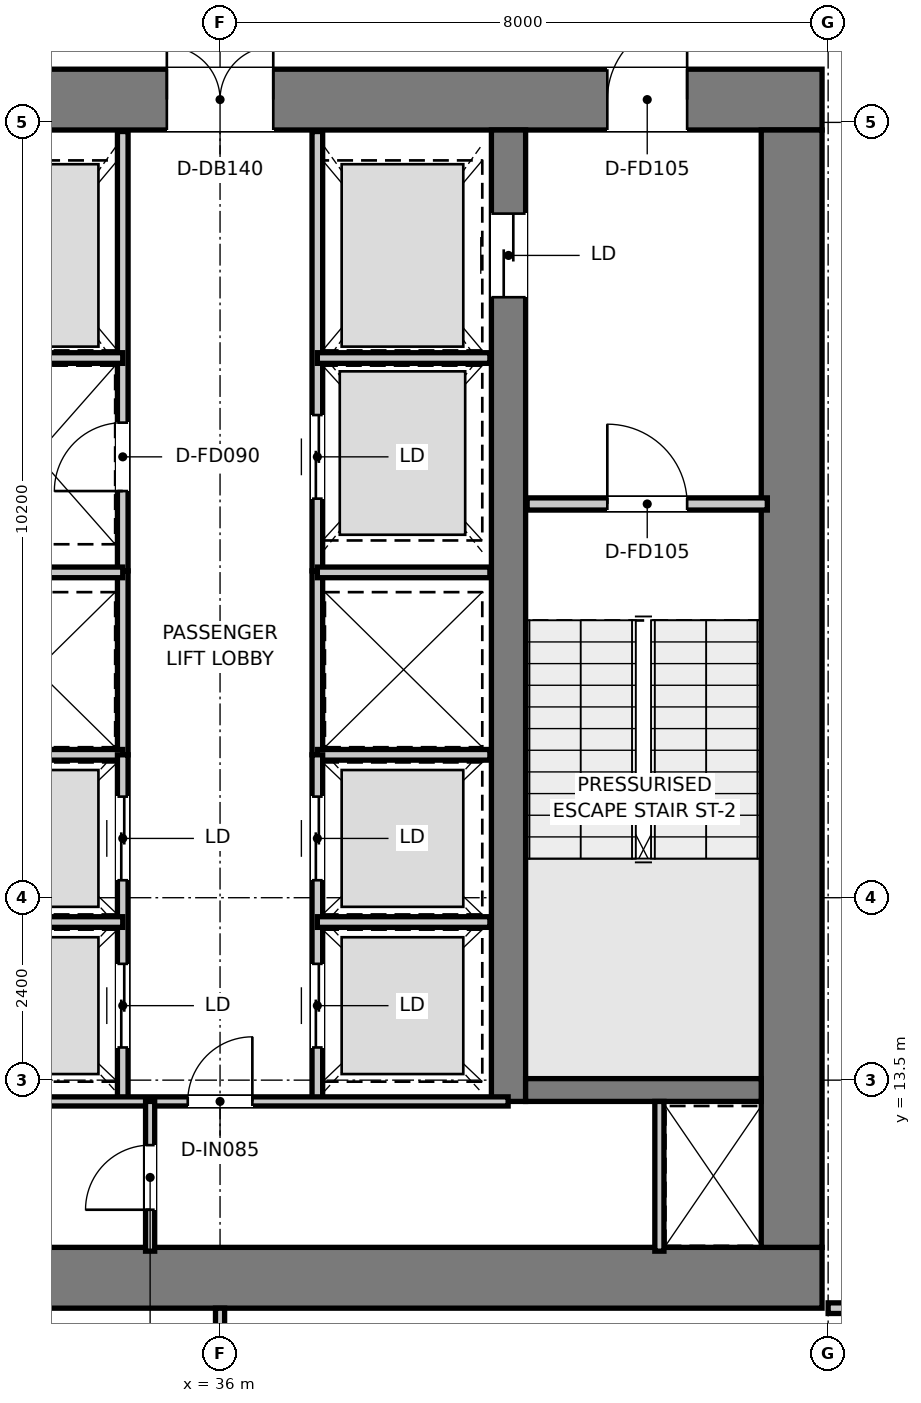
"""IFC4 building model, lengths in metres.
Left out: names, types, materials, properties, quantities, classifications, styles, units other than length and angle.
Written with IfcOpenShell. Run it as: python <this file> out.ifc"""

import sys

from ifc_helpers import new_model, si_unit, direction, frame, frame_2d, origin, place, context, subcontext, project, spatial, rectangle, extrude, element, fill, save


model = new_model("IFC4")
c1 = context("Model", 3, precision=1e-05, world=origin(), true_north=direction((0.0, 1.0)))
c2 = subcontext(c1, "Body", "Model", "MODEL_VIEW")
j1 = project(units=[si_unit("LENGTHUNIT", "METRE"), si_unit("PLANEANGLEUNIT", "RADIAN")], contexts=[c1])
p1 = place(None, origin())
s1 = spatial("IfcSite", under=j1, at=p1, CompositionType="ELEMENT")
p2 = place(p1, origin())
s2 = spatial("IfcBuilding", under=s1, at=p2, CompositionType="ELEMENT")
p3 = place(p2, frame((0.0, 0.0, 101.9)))
s3 = spatial("IfcBuildingStorey", under=s2, at=p3, CompositionType="ELEMENT", Elevation=101.9)
p4 = place(p3, frame((28.08, 10.9, 0.0), z_axis=(0.0, 0.0, 1.0), x_axis=(1.0, 0.0, 0.0)))
e1 = element("IfcWall", 1, at=p4, inside=s3, PredefinedType="SHEAR", context=c2, shape_type="SweptSolid", body=[
    extrude(rectangle(XDim=15.84, YDim=0.8, at=frame_2d((7.92, 0.0))), origin(), (0.0, 0.0, 1.0), 3.95),
])
p5 = place(p3, frame((28.08, 26.4, 0.0), z_axis=(0.0, 0.0, 1.0), x_axis=(1.0, 0.0, 0.0)))
e2 = element("IfcWall", 2, at=p5, inside=s3, PredefinedType="SHEAR", context=c2, shape_type="SweptSolid", body=[
    extrude(rectangle(XDim=15.84, YDim=0.8, at=frame_2d((7.92, 0.0))), origin(), (0.0, 0.0, 1.0), 3.95),
])
p6 = place(p5, frame((7.22, 0.0, 0.0)))
e3 = element("IfcOpeningElement", 3, at=p6, cuts=e2, PredefinedType="OPENING", context=c2, shape_type="SweptSolid", body=[
    extrude(rectangle(XDim=1.4, YDim=2.2, at=frame_2d((0.7, 1.1))), frame((0.0, 0.41, 0.0), z_axis=(0.0, -1.0, 0.0), x_axis=(1.0, 0.0, 0.0)), (0.0, 0.0, 1.0), 0.82),
])
p7 = place(p5, frame((1.775, 0.0, 0.0)))
e4 = element("IfcOpeningElement", 4, at=p7, cuts=e2, PredefinedType="OPENING", context=c2, shape_type="SweptSolid", body=[
    extrude(rectangle(XDim=1.05, YDim=2.1, at=frame_2d((0.525, 1.05))), frame((0.0, 0.41, 0.0), z_axis=(0.0, -1.0, 0.0), x_axis=(1.0, 0.0, 0.0)), (0.0, 0.0, 1.0), 0.82),
])
p8 = place(p5, frame((13.015, 0.0, 0.0)))
e5 = element("IfcOpeningElement", 5, at=p8, cuts=e2, PredefinedType="OPENING", context=c2, shape_type="SweptSolid", body=[
    extrude(rectangle(XDim=1.05, YDim=2.1, at=frame_2d((0.525, 1.05))), frame((0.0, 0.41, 0.0), z_axis=(0.0, -1.0, 0.0), x_axis=(1.0, 0.0, 0.0)), (0.0, 0.0, 1.0), 0.82),
])
p9 = place(p3, frame((43.52, 11.3, 0.0), z_axis=(0.0, 0.0, 1.0), x_axis=(0.0, 1.0, 0.0)))
e6 = element("IfcWall", 6, at=p9, inside=s3, PredefinedType="SHEAR", context=c2, shape_type="SweptSolid", body=[
    extrude(rectangle(XDim=14.7, YDim=0.8, at=frame_2d((7.35, 0.0))), origin(), (0.0, 0.0, 1.0), 3.95),
])
p10 = place(p3, frame((39.795, 13.22, 0.0), z_axis=(0.0, 0.0, 1.0), x_axis=(0.0, 1.0, 0.0)))
e7 = element("IfcWall", 7, at=p10, inside=s3, PredefinedType="SHEAR", context=c2, shape_type="SweptSolid", body=[
    extrude(rectangle(XDim=12.78, YDim=0.45, at=frame_2d((6.39, 0.0))), origin(), (0.0, 0.0, 1.0), 3.95),
])
p11 = place(p10, frame((10.58, 0.0, 0.0)))
e8 = element("IfcOpeningElement", 8, at=p11, cuts=e7, PredefinedType="OPENING", context=c2, shape_type="SweptSolid", body=[
    extrude(rectangle(XDim=1.1, YDim=2.15, at=frame_2d((0.55, 1.075))), frame((0.0, 0.235, 0.0), z_axis=(0.0, -1.0, 0.0), x_axis=(1.0, 0.0, 0.0)), (0.0, 0.0, 1.0), 0.47),
])
p12 = place(p3, frame((40.02, 13.37, 0.0), z_axis=(0.0, 0.0, 1.0), x_axis=(1.0, 0.0, 0.0)))
e9 = element("IfcWall", 9, at=p12, inside=s3, PredefinedType="SHEAR", context=c2, shape_type="SweptSolid", body=[
    extrude(rectangle(XDim=3.1, YDim=0.3, at=frame_2d((1.55, 0.0))), origin(), (0.0, 0.0, 1.0), 3.95),
])
p13 = place(p3, frame((40.04, 21.08, 0.0), z_axis=(0.0, 0.0, 1.0), x_axis=(1.0, 0.0, 0.0)))
e10 = element("IfcWall", 10, at=p13, inside=s3, PredefinedType="PARTITIONING", context=c2, shape_type="SweptSolid", body=[
    extrude(rectangle(XDim=3.16, YDim=0.16, at=frame_2d((1.58, 0.0))), origin(), (0.0, 0.0, 1.0), 3.67),
])
p14 = place(p13, frame((1.055, 0.0, 0.0)))
e11 = element("IfcOpeningElement", 11, at=p14, cuts=e10, PredefinedType="OPENING", context=c2, shape_type="SweptSolid", body=[
    extrude(rectangle(XDim=1.05, YDim=2.1, at=frame_2d((0.525, 1.05))), frame((0.0, 0.09, 0.0), z_axis=(0.0, -1.0, 0.0), x_axis=(1.0, 0.0, 0.0)), (0.0, 0.0, 1.0), 0.18),
])
p15 = place(p3, frame((34.72, 20.2, 0.0), z_axis=(0.0, 0.0, 1.0), x_axis=(0.0, 1.0, 0.0)))
e12 = element("IfcWall", 12, at=p15, inside=s3, PredefinedType="PARTITIONING", context=c2, shape_type="SweptSolid", body=[
    extrude(rectangle(XDim=5.78, YDim=0.14, at=frame_2d((2.89, 0.0))), origin(), (0.0, 0.0, 1.0), 2.67),
])
p16 = place(p15, frame((1.05, 0.0, 0.0)))
e13 = element("IfcOpeningElement", 13, at=p16, cuts=e12, PredefinedType="OPENING", context=c2, shape_type="SweptSolid", body=[
    extrude(rectangle(XDim=0.9, YDim=2.1, at=frame_2d((0.45, 1.05))), frame((0.0, 0.08, 0.0), z_axis=(0.0, -1.0, 0.0), x_axis=(1.0, 0.0, 0.0)), (0.0, 0.0, 1.0), 0.16),
])
p17 = place(p3, frame((37.28, 20.2, 0.0), z_axis=(0.0, 0.0, 1.0), x_axis=(0.0, 1.0, 0.0)))
e14 = element("IfcWall", 14, at=p17, inside=s3, PredefinedType="PARTITIONING", context=c2, shape_type="SweptSolid", body=[
    extrude(rectangle(XDim=5.78, YDim=0.14, at=frame_2d((2.89, 0.0))), origin(), (0.0, 0.0, 1.0), 2.67),
])
p18 = place(p17, frame((0.95, 0.0, 0.0)))
e15 = element("IfcOpeningElement", 15, at=p18, cuts=e14, PredefinedType="OPENING", context=c2, shape_type="SweptSolid", body=[
    extrude(rectangle(XDim=1.1, YDim=2.15, at=frame_2d((0.55, 1.075))), frame((0.0, 0.08, 0.0), z_axis=(0.0, -1.0, 0.0), x_axis=(1.0, 0.0, 0.0)), (0.0, 0.0, 1.0), 0.16),
])
for number, where, z_axis, x_axis in (
    (16, (32.45, 23.0, 0.0), (0.0, 0.0, 1.0), (1.0, 0.0, 0.0)),
    (17, (37.28, 23.0, 0.0), (0.0, 0.0, 1.0), (1.0, 0.0, 0.0)),
):
    element("IfcWall", number, at=place(p3, frame(where, z_axis=z_axis, x_axis=x_axis)), inside=s3, PredefinedType="PARTITIONING", context=c2, shape_type="SweptSolid", body=[
        extrude(rectangle(XDim=2.27, YDim=0.14, at=frame_2d((1.135, 0.0))), origin(), (0.0, 0.0, 1.0), 2.67),
    ])
for number, where, z_axis, x_axis in (
    (18, (34.72, 17.78, 0.0), (0.0, 0.0, 1.0), (0.0, 1.0, 0.0)),
    (19, (37.28, 17.78, 0.0), (0.0, 0.0, 1.0), (0.0, 1.0, 0.0)),
):
    element("IfcWall", number, at=place(p3, frame(where, z_axis=z_axis, x_axis=x_axis)), inside=s3, PredefinedType="PARTITIONING", context=c2, shape_type="SweptSolid", body=[
        extrude(rectangle(XDim=2.42, YDim=0.14, at=frame_2d((1.21, 0.0))), origin(), (0.0, 0.0, 1.0), 3.67),
    ])
for number, where, z_axis, x_axis in (
    (20, (32.45, 17.78, 0.0), (0.0, 0.0, 1.0), (1.0, 0.0, 0.0)),
    (21, (32.45, 20.18, 0.0), (0.0, 0.0, 1.0), (1.0, 0.0, 0.0)),
    (22, (37.28, 17.78, 0.0), (0.0, 0.0, 1.0), (1.0, 0.0, 0.0)),
    (23, (37.28, 20.18, 0.0), (0.0, 0.0, 1.0), (1.0, 0.0, 0.0)),
):
    element("IfcWall", number, at=place(p3, frame(where, z_axis=z_axis, x_axis=x_axis)), inside=s3, PredefinedType="PARTITIONING", context=c2, shape_type="SweptSolid", body=[
        extrude(rectangle(XDim=2.27, YDim=0.14, at=frame_2d((1.135, 0.0))), origin(), (0.0, 0.0, 1.0), 3.67),
    ])
p19 = place(p3, frame((34.72, 13.22, 0.0), z_axis=(0.0, 0.0, 1.0), x_axis=(0.0, 1.0, 0.0)))
e24 = element("IfcWall", 24, at=p19, inside=s3, PredefinedType="PARTITIONING", context=c2, shape_type="SweptSolid", body=[
    extrude(rectangle(XDim=4.56, YDim=0.14, at=frame_2d((2.28, 0.0))), origin(), (0.0, 0.0, 1.0), 3.67),
])
p20 = place(p19, frame((0.71, 0.0, 0.0)))
e25 = element("IfcOpeningElement", 25, at=p20, cuts=e24, PredefinedType="OPENING", context=c2, shape_type="SweptSolid", body=[
    extrude(rectangle(XDim=1.1, YDim=2.15, at=frame_2d((0.55, 1.075))), frame((0.0, 0.08, 0.0), z_axis=(0.0, -1.0, 0.0), x_axis=(1.0, 0.0, 0.0)), (0.0, 0.0, 1.0), 0.16),
])
p21 = place(p19, frame((2.91, 0.0, 0.0)))
e26 = element("IfcOpeningElement", 26, at=p21, cuts=e24, PredefinedType="OPENING", context=c2, shape_type="SweptSolid", body=[
    extrude(rectangle(XDim=1.1, YDim=2.15, at=frame_2d((0.55, 1.075))), frame((0.0, 0.08, 0.0), z_axis=(0.0, -1.0, 0.0), x_axis=(1.0, 0.0, 0.0)), (0.0, 0.0, 1.0), 0.16),
])
p22 = place(p3, frame((32.45, 15.58, 0.0), z_axis=(0.0, 0.0, 1.0), x_axis=(1.0, 0.0, 0.0)))
e27 = element("IfcWall", 27, at=p22, inside=s3, PredefinedType="PARTITIONING", context=c2, shape_type="SweptSolid", body=[
    extrude(rectangle(XDim=2.27, YDim=0.14, at=frame_2d((1.135, 0.0))), origin(), (0.0, 0.0, 1.0), 3.67),
])
p23 = place(p3, frame((37.28, 13.22, 0.0), z_axis=(0.0, 0.0, 1.0), x_axis=(0.0, 1.0, 0.0)))
e28 = element("IfcWall", 28, at=p23, inside=s3, PredefinedType="PARTITIONING", context=c2, shape_type="SweptSolid", body=[
    extrude(rectangle(XDim=4.56, YDim=0.14, at=frame_2d((2.28, 0.0))), origin(), (0.0, 0.0, 1.0), 3.67),
])
p24 = place(p23, frame((0.71, 0.0, 0.0)))
e29 = element("IfcOpeningElement", 29, at=p24, cuts=e28, PredefinedType="OPENING", context=c2, shape_type="SweptSolid", body=[
    extrude(rectangle(XDim=1.1, YDim=2.15, at=frame_2d((0.55, 1.075))), frame((0.0, 0.08, 0.0), z_axis=(0.0, -1.0, 0.0), x_axis=(1.0, 0.0, 0.0)), (0.0, 0.0, 1.0), 0.16),
])
p25 = place(p23, frame((2.91, 0.0, 0.0)))
e30 = element("IfcOpeningElement", 30, at=p25, cuts=e28, PredefinedType="OPENING", context=c2, shape_type="SweptSolid", body=[
    extrude(rectangle(XDim=1.1, YDim=2.15, at=frame_2d((0.55, 1.075))), frame((0.0, 0.08, 0.0), z_axis=(0.0, -1.0, 0.0), x_axis=(1.0, 0.0, 0.0)), (0.0, 0.0, 1.0), 0.16),
])
p26 = place(p3, frame((37.28, 15.58, 0.0), z_axis=(0.0, 0.0, 1.0), x_axis=(1.0, 0.0, 0.0)))
e31 = element("IfcWall", 31, at=p26, inside=s3, PredefinedType="PARTITIONING", context=c2, shape_type="SweptSolid", body=[
    extrude(rectangle(XDim=2.27, YDim=0.14, at=frame_2d((1.135, 0.0))), origin(), (0.0, 0.0, 1.0), 3.67),
])
p27 = place(p3, frame((41.78, 11.25, 0.0), z_axis=(0.0, 0.0, 1.0), x_axis=(0.0, 1.0, 0.0)))
e32 = element("IfcWall", 32, at=p27, inside=s3, PredefinedType="PARTITIONING", context=c2, shape_type="SweptSolid", body=[
    extrude(rectangle(XDim=1.97, YDim=0.12, at=frame_2d((0.985, 0.0))), origin(), (0.0, 0.0, 1.0), 3.67),
])
p28 = place(p3, frame((32.21, 13.22, 0.0), z_axis=(0.0, 0.0, 1.0), x_axis=(1.0, 0.0, 0.0)))
e33 = element("IfcWall", 33, at=p28, inside=s3, PredefinedType="PARTITIONING", context=c2, shape_type="SweptSolid", body=[
    extrude(rectangle(XDim=7.58, YDim=0.12, at=frame_2d((3.79, 0.0))), origin(), (0.0, 0.0, 1.0), 3.67),
])
p29 = place(p28, frame((3.365, 0.0, 0.0)))
e34 = element("IfcOpeningElement", 34, at=p29, cuts=e33, PredefinedType="OPENING", context=c2, shape_type="SweptSolid", body=[
    extrude(rectangle(XDim=0.85, YDim=2.1, at=frame_2d((0.425, 1.05))), frame((0.0, 0.07, 0.0), z_axis=(0.0, -1.0, 0.0), x_axis=(1.0, 0.0, 0.0)), (0.0, 0.0, 1.0), 0.14),
])
p30 = place(p3, frame((35.08, 11.25, 0.0), z_axis=(0.0, 0.0, 1.0), x_axis=(0.0, 1.0, 0.0)))
e35 = element("IfcWall", 35, at=p30, inside=s3, PredefinedType="PARTITIONING", context=c2, shape_type="SweptSolid", body=[
    extrude(rectangle(XDim=1.97, YDim=0.12, at=frame_2d((0.985, 0.0))), origin(), (0.0, 0.0, 1.0), 3.67),
])
p31 = place(p30, frame((0.545, 0.0, 0.0)))
e36 = element("IfcOpeningElement", 36, at=p31, cuts=e35, PredefinedType="OPENING", context=c2, shape_type="SweptSolid", body=[
    extrude(rectangle(XDim=0.85, YDim=2.1, at=frame_2d((0.425, 1.05))), frame((0.0, 0.07, 0.0), z_axis=(0.0, -1.0, 0.0), x_axis=(1.0, 0.0, 0.0)), (0.0, 0.0, 1.0), 0.14),
])
p32 = place(p3, frame((44.0, 10.5, 0.0), z_axis=(0.0, 0.0, 1.0), x_axis=(1.0, 0.0, 0.0)))
e37 = element("IfcWall", 37, at=p32, inside=s3, PredefinedType="PARTITIONING", context=c2, shape_type="SweptSolid", body=[
    extrude(rectangle(XDim=1.68, YDim=0.14, at=frame_2d((0.84, 0.0))), origin(), (0.0, 0.0, 1.0), 3.67),
])
p33 = place(p32, frame((0.385, 0.0, 0.0)))
e38 = element("IfcOpeningElement", 38, at=p33, cuts=e37, PredefinedType="OPENING", context=c2, shape_type="SweptSolid", body=[
    extrude(rectangle(XDim=0.85, YDim=2.1, at=frame_2d((0.425, 1.05))), frame((0.0, 0.08, 0.0), z_axis=(0.0, -1.0, 0.0), x_axis=(1.0, 0.0, 0.0)), (0.0, 0.0, 1.0), 0.16),
])
p34 = place(p3, frame((36.0, 2.582, 0.0), z_axis=(0.0, 0.0, 1.0), x_axis=(0.0, 1.0, 0.0)))
e39 = element("IfcWall", 39, at=p34, inside=s3, PredefinedType="PARTITIONING", context=c2, shape_type="SweptSolid", body=[
    extrude(rectangle(XDim=7.918, YDim=0.12, at=frame_2d((3.959, 0.0))), origin(), (0.0, 0.0, 1.0), 3.67),
])
p35 = place(p14, origin())
e40 = element("IfcDoor", 40, at=p35, inside=s3, OperationType="SINGLE_SWING_LEFT", PredefinedType="DOOR", context=c2, shape_type="SweptSolid", body=[
    extrude(rectangle(XDim=1.05, YDim=2.1, at=frame_2d((0.525, 1.05))), frame((0.0, 0.025, 0.0), z_axis=(0.0, -1.0, 0.0), x_axis=(1.0, 0.0, 0.0)), (0.0, 0.0, 1.0), 0.05),
])
fill(e11, e40)
p36 = place(p6, origin())
e41 = element("IfcDoor", 41, at=p36, inside=s3, OperationType="DOUBLE_DOOR_SINGLE_SWING", PredefinedType="DOOR", context=c2, shape_type="SweptSolid", body=[
    extrude(rectangle(XDim=1.4, YDim=2.2, at=frame_2d((0.7, 1.1))), frame((0.0, 0.025, 0.0), z_axis=(0.0, -1.0, 0.0), x_axis=(1.0, 0.0, 0.0)), (0.0, 0.0, 1.0), 0.05),
])
fill(e3, e41)
p37 = place(p8, origin())
e42 = element("IfcDoor", 42, at=p37, inside=s3, OperationType="SINGLE_SWING_RIGHT", PredefinedType="DOOR", context=c2, shape_type="SweptSolid", body=[
    extrude(rectangle(XDim=1.05, YDim=2.1, at=frame_2d((0.525, 1.05))), frame((0.0, 0.025, 0.0), z_axis=(0.0, -1.0, 0.0), x_axis=(1.0, 0.0, 0.0)), (0.0, 0.0, 1.0), 0.05),
])
fill(e5, e42)
p38 = place(p11, origin())
e43 = element("IfcDoor", 43, at=p38, inside=s3, OperationType="DOUBLE_DOOR_SLIDING", PredefinedType="DOOR", context=c2, shape_type="SweptSolid", body=[
    extrude(rectangle(XDim=1.1, YDim=2.15, at=frame_2d((0.55, 1.075))), frame((0.0, 0.025, 0.0), z_axis=(0.0, -1.0, 0.0), x_axis=(1.0, 0.0, 0.0)), (0.0, 0.0, 1.0), 0.05),
])
fill(e8, e43)
p39 = place(p16, origin())
e44 = element("IfcDoor", 44, at=p39, inside=s3, OperationType="SINGLE_SWING_LEFT", PredefinedType="DOOR", context=c2, shape_type="SweptSolid", body=[
    extrude(rectangle(XDim=0.9, YDim=2.1, at=frame_2d((0.45, 1.05))), frame((0.0, 0.025, 0.0), z_axis=(0.0, -1.0, 0.0), x_axis=(1.0, 0.0, 0.0)), (0.0, 0.0, 1.0), 0.05),
])
fill(e13, e44)
p40 = place(p18, origin())
e45 = element("IfcDoor", 45, at=p40, inside=s3, OperationType="DOUBLE_DOOR_SLIDING", PredefinedType="DOOR", context=c2, shape_type="SweptSolid", body=[
    extrude(rectangle(XDim=1.1, YDim=2.15, at=frame_2d((0.55, 1.075))), frame((0.0, 0.025, 0.0), z_axis=(0.0, -1.0, 0.0), x_axis=(1.0, 0.0, 0.0)), (0.0, 0.0, 1.0), 0.05),
])
fill(e15, e45)
p41 = place(p20, origin())
e46 = element("IfcDoor", 46, at=p41, inside=s3, OperationType="DOUBLE_DOOR_SLIDING", PredefinedType="DOOR", context=c2, shape_type="SweptSolid", body=[
    extrude(rectangle(XDim=1.1, YDim=2.15, at=frame_2d((0.55, 1.075))), frame((0.0, 0.025, 0.0), z_axis=(0.0, -1.0, 0.0), x_axis=(1.0, 0.0, 0.0)), (0.0, 0.0, 1.0), 0.05),
])
fill(e25, e46)
p42 = place(p21, origin())
e47 = element("IfcDoor", 47, at=p42, inside=s3, OperationType="DOUBLE_DOOR_SLIDING", PredefinedType="DOOR", context=c2, shape_type="SweptSolid", body=[
    extrude(rectangle(XDim=1.1, YDim=2.15, at=frame_2d((0.55, 1.075))), frame((0.0, 0.025, 0.0), z_axis=(0.0, -1.0, 0.0), x_axis=(1.0, 0.0, 0.0)), (0.0, 0.0, 1.0), 0.05),
])
fill(e26, e47)
p43 = place(p24, origin())
e48 = element("IfcDoor", 48, at=p43, inside=s3, OperationType="DOUBLE_DOOR_SLIDING", PredefinedType="DOOR", context=c2, shape_type="SweptSolid", body=[
    extrude(rectangle(XDim=1.1, YDim=2.15, at=frame_2d((0.55, 1.075))), frame((0.0, 0.025, 0.0), z_axis=(0.0, -1.0, 0.0), x_axis=(1.0, 0.0, 0.0)), (0.0, 0.0, 1.0), 0.05),
])
fill(e29, e48)
p44 = place(p25, origin())
e49 = element("IfcDoor", 49, at=p44, inside=s3, OperationType="DOUBLE_DOOR_SLIDING", PredefinedType="DOOR", context=c2, shape_type="SweptSolid", body=[
    extrude(rectangle(XDim=1.1, YDim=2.15, at=frame_2d((0.55, 1.075))), frame((0.0, 0.025, 0.0), z_axis=(0.0, -1.0, 0.0), x_axis=(1.0, 0.0, 0.0)), (0.0, 0.0, 1.0), 0.05),
])
fill(e30, e49)
p45 = place(p29, origin())
e50 = element("IfcDoor", 50, at=p45, inside=s3, OperationType="SINGLE_SWING_RIGHT", PredefinedType="DOOR", context=c2, shape_type="SweptSolid", body=[
    extrude(rectangle(XDim=0.85, YDim=2.1, at=frame_2d((0.425, 1.05))), frame((0.0, 0.025, 0.0), z_axis=(0.0, -1.0, 0.0), x_axis=(1.0, 0.0, 0.0)), (0.0, 0.0, 1.0), 0.05),
])
fill(e34, e50)
p46 = place(p31, origin())
e51 = element("IfcDoor", 51, at=p46, inside=s3, OperationType="SINGLE_SWING_LEFT", PredefinedType="DOOR", context=c2, shape_type="SweptSolid", body=[
    extrude(rectangle(XDim=0.85, YDim=2.1, at=frame_2d((0.425, 1.05))), frame((0.0, 0.025, 0.0), z_axis=(0.0, -1.0, 0.0), x_axis=(1.0, 0.0, 0.0)), (0.0, 0.0, 1.0), 0.05),
])
fill(e36, e51)
save(model, sys.argv[1])
